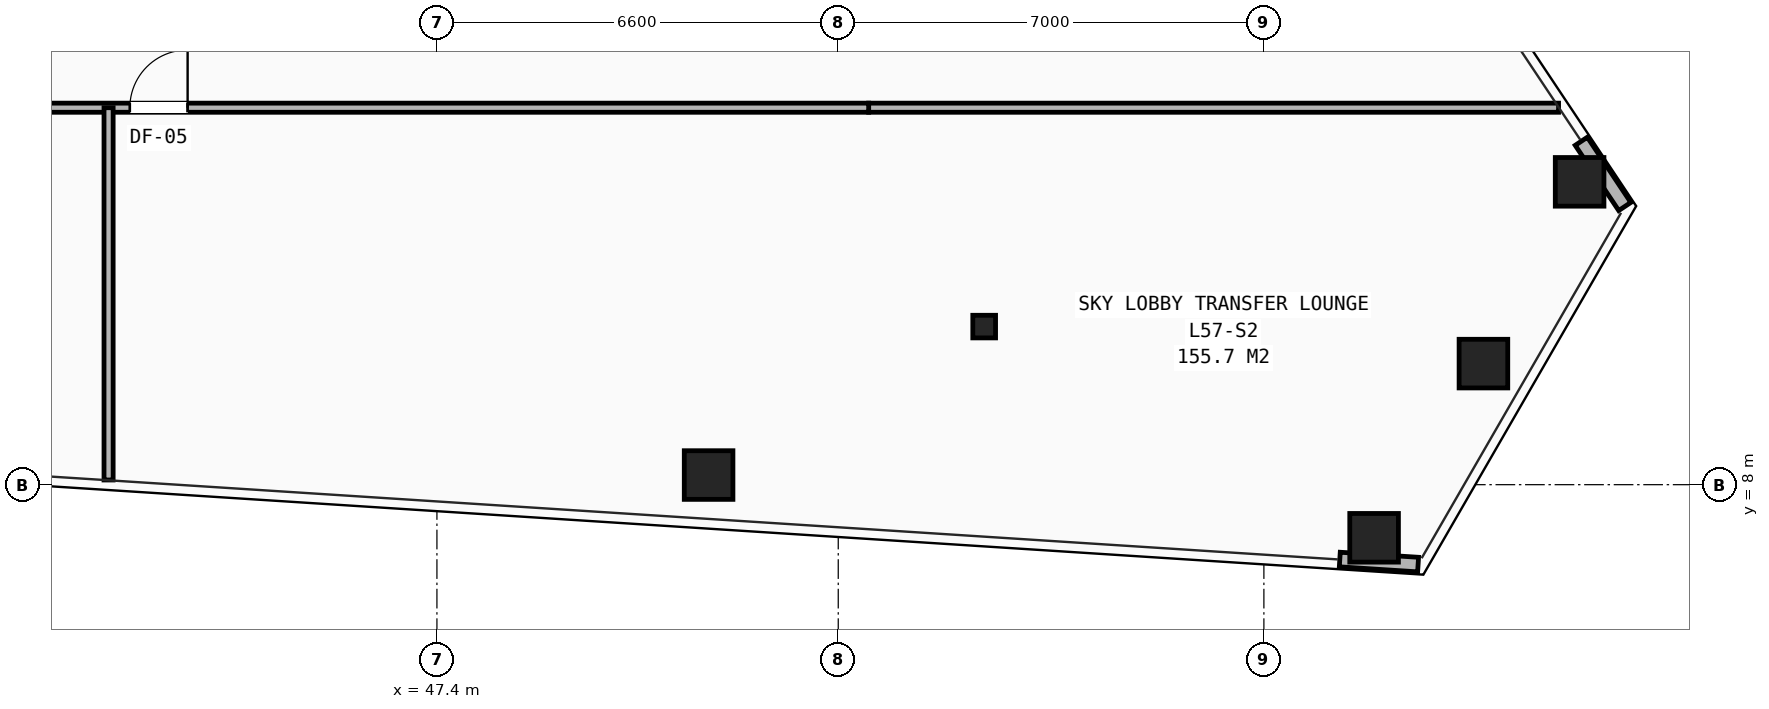
"""IFC4 building model, lengths in metres.
Left out: names, types, materials, properties, quantities, classifications, styles, units other than length and angle.
Written with IfcOpenShell. Run it as: python <this file> out.ifc"""

import sys

from ifc_helpers import new_model, si_unit, direction, frame, frame_2d, origin, origin_2d, place, context, subcontext, project, spatial, rectangle, hollow_rectangle, i_section, extrude, element, fill, save


model = new_model("IFC4")
c1 = context("Model", 3, precision=1e-05, world=origin(), true_north=direction((0.0, 1.0)))
c2 = subcontext(c1, "Body", "Model", "MODEL_VIEW")
j1 = project(units=[si_unit("LENGTHUNIT", "METRE"), si_unit("PLANEANGLEUNIT", "RADIAN")], contexts=[c1])
p1 = place(None, origin())
s1 = spatial("IfcSite", under=j1, at=p1, CompositionType="ELEMENT")
p2 = place(p1, origin())
s2 = spatial("IfcBuilding", under=s1, at=p2, CompositionType="ELEMENT")
p3 = place(p2, frame((0.0, 0.0, 200.7)))
s3 = spatial("IfcBuildingStorey", under=s2, at=p3, CompositionType="ELEMENT", Elevation=200.7)
p4 = place(p3, frame((56.4, 10.6, 0.0), z_axis=(0.0, 0.0, 1.0), x_axis=(1.0, 0.0, 0.0)))
e1 = element("IfcColumn", 1, at=p4, inside=s3, PredefinedType="COLUMN", context=c2, shape_type="SweptSolid", body=[
    extrude(i_section(OverallWidth=0.374, OverallDepth=0.372, WebThickness=0.016, FlangeThickness=0.026, at=origin_2d()), origin(), (0.0, 0.0, 1.0), 4.2),
])
for number, where, z_axis, x_axis in (
    (2, (51.868, 8.158, 0.0), (0.0, 0.0, 1.0), (1.0, 0.0, 0.0)),
    (3, (62.812, 7.126, 0.0), (0.0, 0.0, 1.0), (1.0, 0.0, 0.0)),
    (4, (64.611, 9.991, 0.0), (0.0, 0.0, 1.0), (1.0, 0.0, 0.0)),
    (5, (66.192, 12.981, 0.0), (0.0, 0.0, 1.0), (1.0, 0.0, 0.0)),
):
    element("IfcColumn", number, at=place(p3, frame(where, z_axis=z_axis, x_axis=x_axis)), inside=s3, PredefinedType="COLUMN", context=c2, shape_type="SweptSolid", body=[
        extrude(hollow_rectangle(XDim=0.8, YDim=0.8, WallThickness=0.055, at=origin_2d()), origin(), (0.0, 0.0, 1.0), 4.2),
    ])
p5 = place(p3, frame((62.248, 6.769, 0.0), z_axis=(0.0, 0.0, 1.0), x_axis=(0.997929227966, -0.064321504741, 0.0)))
e6 = element("IfcWall", 6, at=p5, inside=s3, PredefinedType="SHEAR", context=c2, shape_type="SweptSolid", body=[
    extrude(rectangle(XDim=1.291, YDim=0.24, at=frame_2d((0.645, 0.0))), origin(), (0.0, 0.0, 1.0), 3.323),
])
p6 = place(p3, frame((66.935, 12.575, 0.0), z_axis=(0.0, 0.0, 1.0), x_axis=(-0.554700196225, 0.832050294338, 0.0)))
e7 = element("IfcWall", 7, at=p6, inside=s3, PredefinedType="SHEAR", context=c2, shape_type="SweptSolid", body=[
    extrude(rectangle(XDim=1.29, YDim=0.24, at=frame_2d((0.645, 0.0))), origin(), (0.0, 0.0, 1.0), 3.323),
])
p7 = place(p3, frame((54.5, 14.2, 0.0), z_axis=(0.0, 0.0, 1.0), x_axis=(1.0, 0.0, 0.0)))
e8 = element("IfcWall", 8, at=p7, inside=s3, PredefinedType="PARTITIONING", context=c2, shape_type="SweptSolid", body=[
    extrude(rectangle(XDim=11.346, YDim=0.15, at=frame_2d((5.673, 0.0))), origin(), (0.0, 0.0, 1.0), 2.965),
])
p8 = place(p3, frame((25.5, 14.2, 0.0), z_axis=(0.0, 0.0, 1.0), x_axis=(1.0, 0.0, 0.0)))
e9 = element("IfcWall", 9, at=p8, inside=s3, PredefinedType="PARTITIONING", context=c2, shape_type="SweptSolid", body=[
    extrude(rectangle(XDim=29.0, YDim=0.15, at=frame_2d((14.5, 0.0))), origin(), (0.0, 0.0, 1.0), 2.965),
])
p9 = place(p8, frame((0.85, 0.0, 0.0)))
e10 = element("IfcOpeningElement", 10, at=p9, cuts=e9, PredefinedType="OPENING", context=c2, shape_type="SweptSolid", body=[
    extrude(rectangle(XDim=0.95, YDim=2.1, at=frame_2d((0.475, 1.05))), frame((0.0, 0.085, 0.0), z_axis=(0.0, -1.0, 0.0), x_axis=(1.0, 0.0, 0.0)), (0.0, 0.0, 1.0), 0.17),
])
p10 = place(p8, frame((16.85, 0.0, 0.0)))
e11 = element("IfcOpeningElement", 11, at=p10, cuts=e9, PredefinedType="OPENING", context=c2, shape_type="SweptSolid", body=[
    extrude(rectangle(XDim=0.95, YDim=2.1, at=frame_2d((0.475, 1.05))), frame((0.0, 0.085, 0.0), z_axis=(0.0, -1.0, 0.0), x_axis=(1.0, 0.0, 0.0)), (0.0, 0.0, 1.0), 0.17),
])
p11 = place(p3, frame((42.0, 8.077, 0.0), z_axis=(0.0, 0.0, 1.0), x_axis=(0.0, 1.0, 0.0)))
e12 = element("IfcWall", 12, at=p11, inside=s3, PredefinedType="PARTITIONING", context=c2, shape_type="SweptSolid", body=[
    extrude(rectangle(XDim=6.123, YDim=0.15, at=frame_2d((3.062, 0.0))), origin(), (0.0, 0.0, 1.0), 3.329),
])
p12 = place(p10, origin())
e13 = element("IfcDoor", 13, at=p12, inside=s3, OperationType="SINGLE_SWING_RIGHT", PredefinedType="DOOR", context=c2, shape_type="SweptSolid", body=[
    extrude(rectangle(XDim=0.95, YDim=2.1, at=frame_2d((0.475, 1.05))), frame((0.0, 0.025, 0.0), z_axis=(0.0, -1.0, 0.0), x_axis=(1.0, 0.0, 0.0)), (0.0, 0.0, 1.0), 0.05),
])
fill(e11, e13)
save(model, sys.argv[1])
